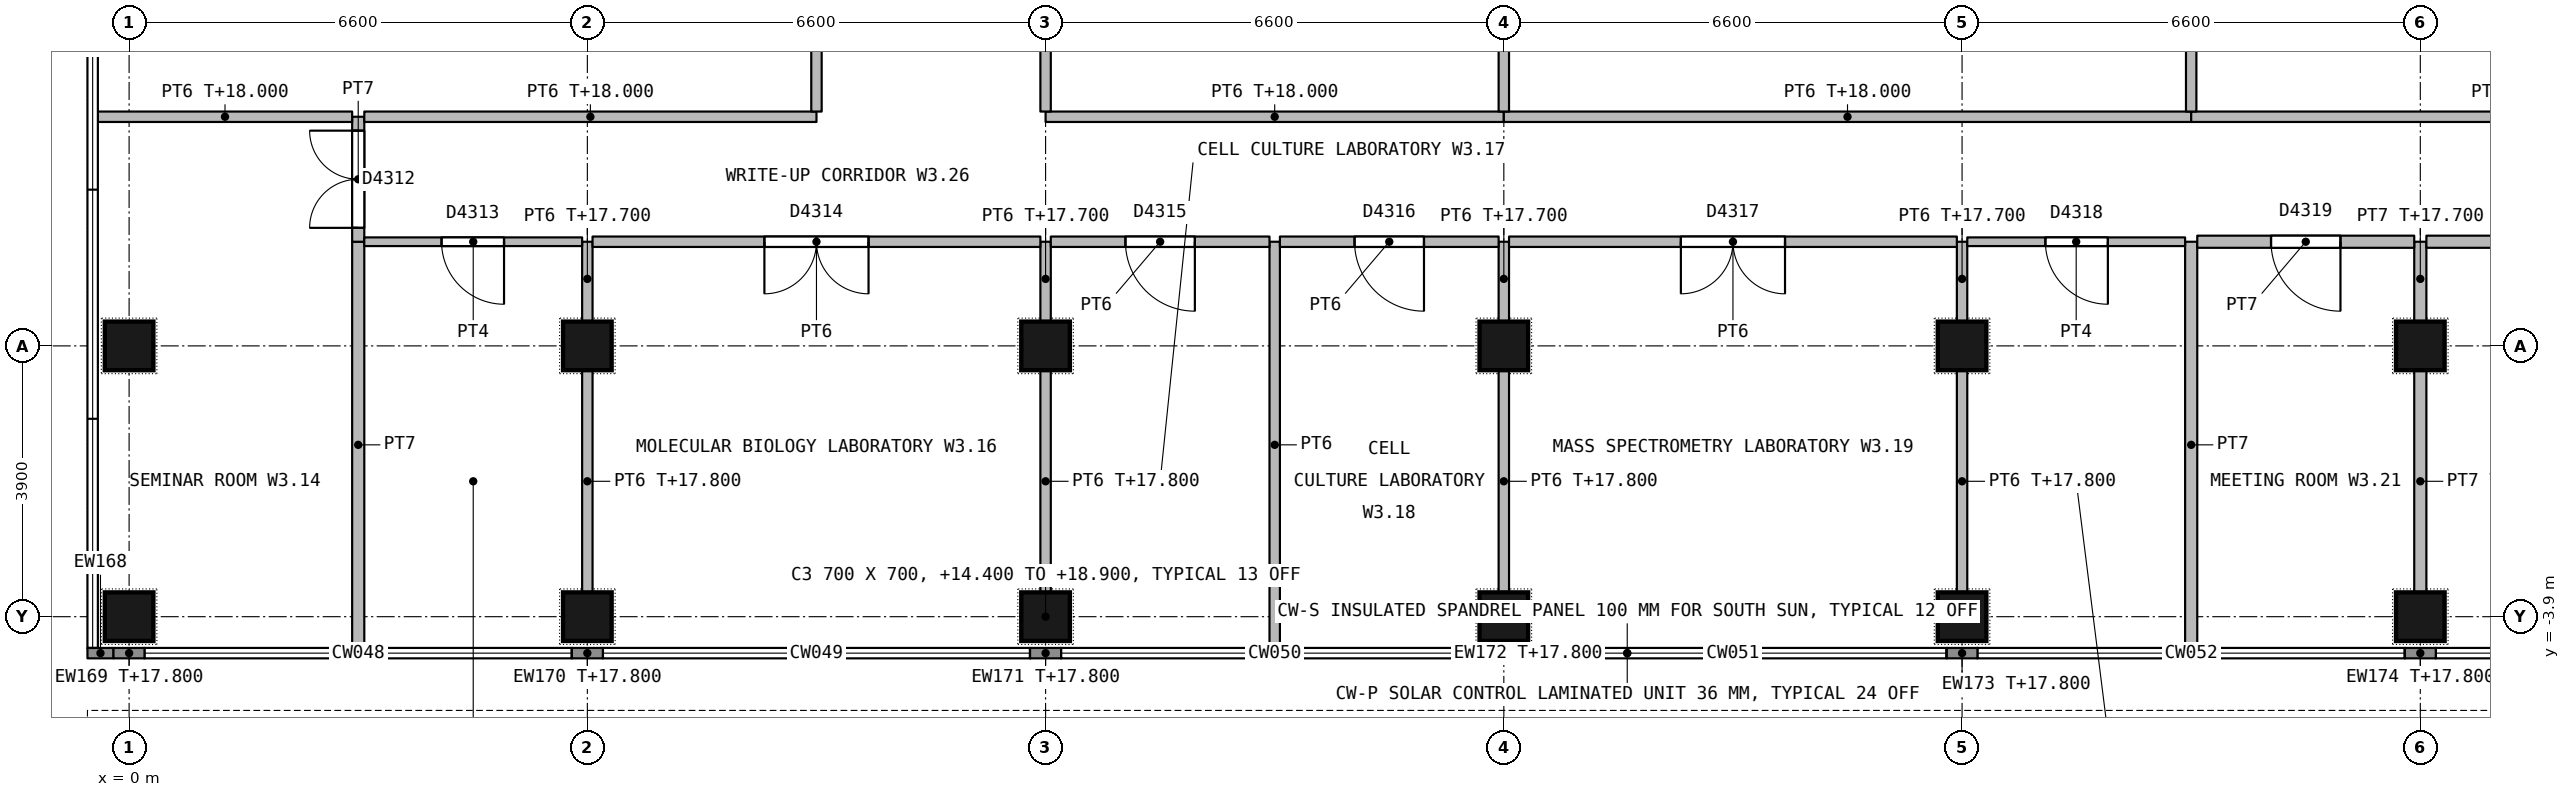
"""IFC4 building model, lengths in metres.
Left out: names, types, materials, properties, quantities, classifications, styles, units other than length and angle.
Written with IfcOpenShell. Run it as: python <this file> out.ifc"""

import sys

from ifc_helpers import new_model, si_unit, direction, frame, frame_2d, origin, origin_2d, place, context, subcontext, project, spatial, rectangle, extrude, element, fill, save


model = new_model("IFC4")
c1 = context("Model", 3, precision=1e-05, world=origin(), true_north=direction((0.0, 1.0)))
c2 = subcontext(c1, "Body", "Model", "MODEL_VIEW")
j1 = project(units=[si_unit("LENGTHUNIT", "METRE"), si_unit("PLANEANGLEUNIT", "RADIAN")], contexts=[c1])
p1 = place(None, origin())
s1 = spatial("IfcSite", under=j1, at=p1, CompositionType="ELEMENT")
p2 = place(p1, origin())
s2 = spatial("IfcBuilding", under=s1, at=p2, CompositionType="ELEMENT")
p3 = place(p2, frame((0.0, 0.0, 14.4)))
s3 = spatial("IfcBuildingStorey", under=s2, at=p3, CompositionType="ELEMENT", Elevation=14.4)
for number, where, z_axis, x_axis in (
    (1, (0.0, 0.0, 0.0), (0.0, 0.0, 1.0), (1.0, 0.0, 0.0)),
    (2, (6.6, 0.0, 0.0), (0.0, 0.0, 1.0), (1.0, 0.0, 0.0)),
    (3, (13.2, 0.0, 0.0), (0.0, 0.0, 1.0), (1.0, 0.0, 0.0)),
    (4, (19.8, 0.0, 0.0), (0.0, 0.0, 1.0), (1.0, 0.0, 0.0)),
    (5, (26.4, 0.0, 0.0), (0.0, 0.0, 1.0), (1.0, 0.0, 0.0)),
    (6, (33.0, 0.0, 0.0), (0.0, 0.0, 1.0), (1.0, 0.0, 0.0)),
    (7, (0.0, -3.9, 0.0), (0.0, 0.0, 1.0), (1.0, 0.0, 0.0)),
    (8, (6.6, -3.9, 0.0), (0.0, 0.0, 1.0), (1.0, 0.0, 0.0)),
    (9, (13.2, -3.9, 0.0), (0.0, 0.0, 1.0), (1.0, 0.0, 0.0)),
    (10, (19.8, -3.9, 0.0), (0.0, 0.0, 1.0), (1.0, 0.0, 0.0)),
    (11, (26.4, -3.9, 0.0), (0.0, 0.0, 1.0), (1.0, 0.0, 0.0)),
    (12, (33.0, -3.9, 0.0), (0.0, 0.0, 1.0), (1.0, 0.0, 0.0)),
):
    element("IfcColumn", number, at=place(p3, frame(where, z_axis=z_axis, x_axis=x_axis)), inside=s3, PredefinedType="COLUMN", context=c2, shape_type="SweptSolid", body=[
        extrude(rectangle(XDim=0.7, YDim=0.7, at=origin_2d()), origin(), (0.0, 0.0, 1.0), 4.5),
    ])
p4 = place(p3, frame((-0.225, -4.425, 0.0), z_axis=(0.0, 0.0, 1.0), x_axis=(-1.0, 0.0, 0.0)))
e13 = element("IfcWall", 13, at=p4, inside=s3, PredefinedType="STANDARD", context=c2, shape_type="SweptSolid", body=[
    extrude(rectangle(XDim=0.375, YDim=0.15, at=frame_2d((0.188, 0.0))), origin(), (0.0, 0.0, 1.0), 4.2),
])
p5 = place(p3, frame((0.225, -4.425, 0.0), z_axis=(0.0, 0.0, 1.0), x_axis=(-1.0, 0.0, 0.0)))
e14 = element("IfcWall", 14, at=p5, inside=s3, PredefinedType="STANDARD", context=c2, shape_type="SweptSolid", body=[
    extrude(rectangle(XDim=0.45, YDim=0.15, at=frame_2d((0.225, 0.0))), origin(), (0.0, 0.0, 1.0), 3.4),
])
for number, where, z_axis, x_axis in (
    (15, (6.825, -4.425, 0.0), (0.0, 0.0, 1.0), (-1.0, 0.0, 0.0)),
    (16, (13.425, -4.425, 0.0), (0.0, 0.0, 1.0), (-1.0, 0.0, 0.0)),
    (17, (20.025, -4.425, 0.0), (0.0, 0.0, 1.0), (-1.0, 0.0, 0.0)),
    (18, (26.625, -4.425, 0.0), (0.0, 0.0, 1.0), (-1.0, 0.0, 0.0)),
):
    element("IfcWall", number, at=place(p3, frame(where, z_axis=z_axis, x_axis=x_axis)), inside=s3, PredefinedType="STANDARD", context=c2, shape_type="SweptSolid", body=[
        extrude(rectangle(XDim=0.45, YDim=0.15, at=frame_2d((0.225, 0.0))), origin(), (0.0, 0.0, 1.0), 3.4),
    ])
p6 = place(p3, frame((33.225, -4.425, 0.0), z_axis=(0.0, 0.0, 1.0), x_axis=(-1.0, 0.0, 0.0)))
e19 = element("IfcWall", 19, at=p6, inside=s3, PredefinedType="STANDARD", context=c2, shape_type="SweptSolid", body=[
    extrude(rectangle(XDim=0.45, YDim=0.15, at=frame_2d((0.225, 0.0))), origin(), (0.0, 0.0, 1.0), 3.4),
])
p7 = place(p3, frame((3.3, -4.35, 0.0), z_axis=(0.0, 0.0, 1.0), x_axis=(0.0, 1.0, 0.0)))
e20 = element("IfcWall", 20, at=p7, inside=s3, PredefinedType="PARTITIONING", context=c2, shape_type="SweptSolid", body=[
    extrude(rectangle(XDim=5.85, YDim=0.175, at=frame_2d((2.925, 0.0))), origin(), (0.0, 0.0, 1.0), 4.2),
])
p8 = place(p3, frame((3.3, 1.5, 0.0), z_axis=(0.0, 0.0, 1.0), x_axis=(0.0, 1.0, 0.0)))
e21 = element("IfcWall", 21, at=p8, inside=s3, PredefinedType="PARTITIONING", context=c2, shape_type="SweptSolid", body=[
    extrude(rectangle(XDim=1.8, YDim=0.175, at=frame_2d((0.9, 0.0))), origin(), (0.0, 0.0, 1.0), 4.2),
])
p9 = place(p8, frame((0.2, 0.0, 0.0)))
e22 = element("IfcOpeningElement", 22, at=p9, cuts=e21, PredefinedType="OPENING", context=c2, shape_type="SweptSolid", body=[
    extrude(rectangle(XDim=1.4, YDim=2.1, at=frame_2d((0.7, 1.05))), frame((0.0, 0.097, 0.0), z_axis=(0.0, -1.0, 0.0), x_axis=(1.0, 0.0, 0.0)), (0.0, 0.0, 1.0), 0.195),
])
p10 = place(p3, frame((3.212, 3.3, 0.0), z_axis=(0.0, 0.0, 1.0), x_axis=(-1.0, 0.0, 0.0)))
e23 = element("IfcWall", 23, at=p10, inside=s3, PredefinedType="PARTITIONING", context=c2, shape_type="SweptSolid", body=[
    extrude(rectangle(XDim=3.662, YDim=0.15, at=frame_2d((1.831, 0.0))), origin(), (0.0, 0.0, 1.0), 3.6),
])
p11 = place(p3, frame((6.6, -3.55, 0.0), z_axis=(0.0, 0.0, 1.0), x_axis=(0.0, 1.0, 0.0)))
e24 = element("IfcWall", 24, at=p11, inside=s3, PredefinedType="PARTITIONING", context=c2, shape_type="SweptSolid", body=[
    extrude(rectangle(XDim=3.2, YDim=0.15, at=frame_2d((1.6, 0.0))), origin(), (0.0, 0.0, 1.0), 3.4),
])
p12 = place(p3, frame((6.6, 0.35, 0.0), z_axis=(0.0, 0.0, 1.0), x_axis=(0.0, 1.0, 0.0)))
e25 = element("IfcWall", 25, at=p12, inside=s3, PredefinedType="PARTITIONING", context=c2, shape_type="SweptSolid", body=[
    extrude(rectangle(XDim=1.15, YDim=0.15, at=frame_2d((0.575, 0.0))), origin(), (0.0, 0.0, 1.0), 3.3),
])
p13 = place(p3, frame((6.525, 1.5, 0.0), z_axis=(0.0, 0.0, 1.0), x_axis=(-1.0, 0.0, 0.0)))
e26 = element("IfcWall", 26, at=p13, inside=s3, PredefinedType="PARTITIONING", context=c2, shape_type="SweptSolid", body=[
    extrude(rectangle(XDim=3.137, YDim=0.125, at=frame_2d((1.569, 0.0))), origin(), (0.0, 0.0, 1.0), 4.2),
])
p14 = place(p13, frame((1.125, 0.0, 0.0)))
e27 = element("IfcOpeningElement", 27, at=p14, cuts=e26, PredefinedType="OPENING", context=c2, shape_type="SweptSolid", body=[
    extrude(rectangle(XDim=0.9, YDim=2.1, at=frame_2d((0.45, 1.05))), frame((0.0, 0.073, 0.0), z_axis=(0.0, -1.0, 0.0), x_axis=(1.0, 0.0, 0.0)), (0.0, 0.0, 1.0), 0.145),
])
p15 = place(p3, frame((13.2, -3.55, 0.0), z_axis=(0.0, 0.0, 1.0), x_axis=(0.0, 1.0, 0.0)))
e28 = element("IfcWall", 28, at=p15, inside=s3, PredefinedType="PARTITIONING", context=c2, shape_type="SweptSolid", body=[
    extrude(rectangle(XDim=3.2, YDim=0.15, at=frame_2d((1.6, 0.0))), origin(), (0.0, 0.0, 1.0), 3.4),
])
p16 = place(p3, frame((13.2, 0.35, 0.0), z_axis=(0.0, 0.0, 1.0), x_axis=(0.0, 1.0, 0.0)))
e29 = element("IfcWall", 29, at=p16, inside=s3, PredefinedType="PARTITIONING", context=c2, shape_type="SweptSolid", body=[
    extrude(rectangle(XDim=1.15, YDim=0.15, at=frame_2d((0.575, 0.0))), origin(), (0.0, 0.0, 1.0), 3.3),
])
p17 = place(p3, frame((13.125, 1.5, 0.0), z_axis=(0.0, 0.0, 1.0), x_axis=(-1.0, 0.0, 0.0)))
e30 = element("IfcWall", 30, at=p17, inside=s3, PredefinedType="PARTITIONING", context=c2, shape_type="SweptSolid", body=[
    extrude(rectangle(XDim=6.45, YDim=0.15, at=frame_2d((3.225, 0.0))), origin(), (0.0, 0.0, 1.0), 4.2),
])
p18 = place(p17, frame((2.475, 0.0, 0.0)))
e31 = element("IfcOpeningElement", 31, at=p18, cuts=e30, PredefinedType="OPENING", context=c2, shape_type="SweptSolid", body=[
    extrude(rectangle(XDim=1.5, YDim=2.1, at=frame_2d((0.75, 1.05))), frame((0.0, 0.085, 0.0), z_axis=(0.0, -1.0, 0.0), x_axis=(1.0, 0.0, 0.0)), (0.0, 0.0, 1.0), 0.17),
])
p19 = place(p3, frame((16.5, -4.35, 0.0), z_axis=(0.0, 0.0, 1.0), x_axis=(0.0, 1.0, 0.0)))
e32 = element("IfcWall", 32, at=p19, inside=s3, PredefinedType="PARTITIONING", context=c2, shape_type="SweptSolid", body=[
    extrude(rectangle(XDim=5.85, YDim=0.15, at=frame_2d((2.925, 0.0))), origin(), (0.0, 0.0, 1.0), 4.2),
])
p20 = place(p3, frame((16.425, 1.5, 0.0), z_axis=(0.0, 0.0, 1.0), x_axis=(-1.0, 0.0, 0.0)))
e33 = element("IfcWall", 33, at=p20, inside=s3, PredefinedType="PARTITIONING", context=c2, shape_type="SweptSolid", body=[
    extrude(rectangle(XDim=3.15, YDim=0.15, at=frame_2d((1.575, 0.0))), origin(), (0.0, 0.0, 1.0), 4.2),
])
p21 = place(p20, frame((1.075, 0.0, 0.0)))
e34 = element("IfcOpeningElement", 34, at=p21, cuts=e33, PredefinedType="OPENING", context=c2, shape_type="SweptSolid", body=[
    extrude(rectangle(XDim=1.0, YDim=2.1, at=frame_2d((0.5, 1.05))), frame((0.0, 0.085, 0.0), z_axis=(0.0, -1.0, 0.0), x_axis=(1.0, 0.0, 0.0)), (0.0, 0.0, 1.0), 0.17),
])
p22 = place(p3, frame((19.8, -3.55, 0.0), z_axis=(0.0, 0.0, 1.0), x_axis=(0.0, 1.0, 0.0)))
e35 = element("IfcWall", 35, at=p22, inside=s3, PredefinedType="PARTITIONING", context=c2, shape_type="SweptSolid", body=[
    extrude(rectangle(XDim=3.2, YDim=0.15, at=frame_2d((1.6, 0.0))), origin(), (0.0, 0.0, 1.0), 3.4),
])
p23 = place(p3, frame((19.8, 0.35, 0.0), z_axis=(0.0, 0.0, 1.0), x_axis=(0.0, 1.0, 0.0)))
e36 = element("IfcWall", 36, at=p23, inside=s3, PredefinedType="PARTITIONING", context=c2, shape_type="SweptSolid", body=[
    extrude(rectangle(XDim=1.15, YDim=0.15, at=frame_2d((0.575, 0.0))), origin(), (0.0, 0.0, 1.0), 3.3),
])
p24 = place(p3, frame((19.725, 1.5, 0.0), z_axis=(0.0, 0.0, 1.0), x_axis=(-1.0, 0.0, 0.0)))
e37 = element("IfcWall", 37, at=p24, inside=s3, PredefinedType="PARTITIONING", context=c2, shape_type="SweptSolid", body=[
    extrude(rectangle(XDim=3.15, YDim=0.15, at=frame_2d((1.575, 0.0))), origin(), (0.0, 0.0, 1.0), 4.2),
])
p25 = place(p24, frame((1.075, 0.0, 0.0)))
e38 = element("IfcOpeningElement", 38, at=p25, cuts=e37, PredefinedType="OPENING", context=c2, shape_type="SweptSolid", body=[
    extrude(rectangle(XDim=1.0, YDim=2.1, at=frame_2d((0.5, 1.05))), frame((0.0, 0.085, 0.0), z_axis=(0.0, -1.0, 0.0), x_axis=(1.0, 0.0, 0.0)), (0.0, 0.0, 1.0), 0.17),
])
p26 = place(p3, frame((26.4, -3.55, 0.0), z_axis=(0.0, 0.0, 1.0), x_axis=(0.0, 1.0, 0.0)))
e39 = element("IfcWall", 39, at=p26, inside=s3, PredefinedType="PARTITIONING", context=c2, shape_type="SweptSolid", body=[
    extrude(rectangle(XDim=3.2, YDim=0.15, at=frame_2d((1.6, 0.0))), origin(), (0.0, 0.0, 1.0), 3.4),
])
p27 = place(p3, frame((26.4, 0.35, 0.0), z_axis=(0.0, 0.0, 1.0), x_axis=(0.0, 1.0, 0.0)))
e40 = element("IfcWall", 40, at=p27, inside=s3, PredefinedType="PARTITIONING", context=c2, shape_type="SweptSolid", body=[
    extrude(rectangle(XDim=1.15, YDim=0.15, at=frame_2d((0.575, 0.0))), origin(), (0.0, 0.0, 1.0), 3.3),
])
p28 = place(p3, frame((26.325, 1.5, 0.0), z_axis=(0.0, 0.0, 1.0), x_axis=(-1.0, 0.0, 0.0)))
e41 = element("IfcWall", 41, at=p28, inside=s3, PredefinedType="PARTITIONING", context=c2, shape_type="SweptSolid", body=[
    extrude(rectangle(XDim=6.45, YDim=0.15, at=frame_2d((3.225, 0.0))), origin(), (0.0, 0.0, 1.0), 4.2),
])
p29 = place(p28, frame((2.475, 0.0, 0.0)))
e42 = element("IfcOpeningElement", 42, at=p29, cuts=e41, PredefinedType="OPENING", context=c2, shape_type="SweptSolid", body=[
    extrude(rectangle(XDim=1.5, YDim=2.1, at=frame_2d((0.75, 1.05))), frame((0.0, 0.085, 0.0), z_axis=(0.0, -1.0, 0.0), x_axis=(1.0, 0.0, 0.0)), (0.0, 0.0, 1.0), 0.17),
])
p30 = place(p3, frame((29.7, -4.35, 0.0), z_axis=(0.0, 0.0, 1.0), x_axis=(0.0, 1.0, 0.0)))
e43 = element("IfcWall", 43, at=p30, inside=s3, PredefinedType="PARTITIONING", context=c2, shape_type="SweptSolid", body=[
    extrude(rectangle(XDim=5.85, YDim=0.175, at=frame_2d((2.925, 0.0))), origin(), (0.0, 0.0, 1.0), 4.2),
])
p31 = place(p3, frame((29.613, 1.5, 0.0), z_axis=(0.0, 0.0, 1.0), x_axis=(-1.0, 0.0, 0.0)))
e44 = element("IfcWall", 44, at=p31, inside=s3, PredefinedType="PARTITIONING", context=c2, shape_type="SweptSolid", body=[
    extrude(rectangle(XDim=3.137, YDim=0.125, at=frame_2d((1.569, 0.0))), origin(), (0.0, 0.0, 1.0), 4.2),
])
p32 = place(p31, frame((1.113, 0.0, 0.0)))
e45 = element("IfcOpeningElement", 45, at=p32, cuts=e44, PredefinedType="OPENING", context=c2, shape_type="SweptSolid", body=[
    extrude(rectangle(XDim=0.9, YDim=2.1, at=frame_2d((0.45, 1.05))), frame((0.0, 0.073, 0.0), z_axis=(0.0, -1.0, 0.0), x_axis=(1.0, 0.0, 0.0)), (0.0, 0.0, 1.0), 0.145),
])
p33 = place(p3, frame((33.0, -3.55, 0.0), z_axis=(0.0, 0.0, 1.0), x_axis=(0.0, 1.0, 0.0)))
e46 = element("IfcWall", 46, at=p33, inside=s3, PredefinedType="PARTITIONING", context=c2, shape_type="SweptSolid", body=[
    extrude(rectangle(XDim=3.2, YDim=0.175, at=frame_2d((1.6, 0.0))), origin(), (0.0, 0.0, 1.0), 3.4),
])
p34 = place(p3, frame((33.0, 0.35, 0.0), z_axis=(0.0, 0.0, 1.0), x_axis=(0.0, 1.0, 0.0)))
e47 = element("IfcWall", 47, at=p34, inside=s3, PredefinedType="PARTITIONING", context=c2, shape_type="SweptSolid", body=[
    extrude(rectangle(XDim=1.15, YDim=0.175, at=frame_2d((0.575, 0.0))), origin(), (0.0, 0.0, 1.0), 3.3),
])
p35 = place(p3, frame((32.913, 1.5, 0.0), z_axis=(0.0, 0.0, 1.0), x_axis=(-1.0, 0.0, 0.0)))
e48 = element("IfcWall", 48, at=p35, inside=s3, PredefinedType="PARTITIONING", context=c2, shape_type="SweptSolid", body=[
    extrude(rectangle(XDim=3.125, YDim=0.175, at=frame_2d((1.562, 0.0))), origin(), (0.0, 0.0, 1.0), 4.2),
])
p36 = place(p35, frame((1.062, 0.0, 0.0)))
e49 = element("IfcOpeningElement", 49, at=p36, cuts=e48, PredefinedType="OPENING", context=c2, shape_type="SweptSolid", body=[
    extrude(rectangle(XDim=1.0, YDim=2.1, at=frame_2d((0.5, 1.05))), frame((0.0, 0.097, 0.0), z_axis=(0.0, -1.0, 0.0), x_axis=(1.0, 0.0, 0.0)), (0.0, 0.0, 1.0), 0.195),
])
p37 = place(p3, frame((39.525, 1.5, 0.0), z_axis=(0.0, 0.0, 1.0), x_axis=(-1.0, 0.0, 0.0)))
e50 = element("IfcWall", 50, at=p37, inside=s3, PredefinedType="PARTITIONING", context=c2, shape_type="SweptSolid", body=[
    extrude(rectangle(XDim=6.438, YDim=0.175, at=frame_2d((3.219, 0.0))), origin(), (0.0, 0.0, 1.0), 4.2),
])
p38 = place(p37, frame((2.525, 0.0, 0.0)))
e51 = element("IfcOpeningElement", 51, at=p38, cuts=e50, PredefinedType="OPENING", context=c2, shape_type="SweptSolid", body=[
    extrude(rectangle(XDim=1.4, YDim=2.1, at=frame_2d((0.7, 1.05))), frame((0.0, 0.097, 0.0), z_axis=(0.0, -1.0, 0.0), x_axis=(1.0, 0.0, 0.0)), (0.0, 0.0, 1.0), 0.195),
])
p39 = place(p3, frame((9.9, 3.3, 0.0), z_axis=(0.0, 0.0, 1.0), x_axis=(-1.0, 0.0, 0.0)))
e52 = element("IfcWall", 52, at=p39, inside=s3, PredefinedType="PARTITIONING", context=c2, shape_type="SweptSolid", body=[
    extrude(rectangle(XDim=6.512, YDim=0.15, at=frame_2d((3.256, 0.0))), origin(), (0.0, 0.0, 1.0), 3.6),
])
p40 = place(p3, frame((19.8, 3.3, 0.0), z_axis=(0.0, 0.0, 1.0), x_axis=(-1.0, 0.0, 0.0)))
e53 = element("IfcWall", 53, at=p40, inside=s3, PredefinedType="PARTITIONING", context=c2, shape_type="SweptSolid", body=[
    extrude(rectangle(XDim=6.6, YDim=0.15, at=frame_2d((3.3, 0.0))), origin(), (0.0, 0.0, 1.0), 3.6),
])
p41 = place(p3, frame((29.7, 3.3, 0.0), z_axis=(0.0, 0.0, 1.0), x_axis=(-1.0, 0.0, 0.0)))
e54 = element("IfcWall", 54, at=p41, inside=s3, PredefinedType="PARTITIONING", context=c2, shape_type="SweptSolid", body=[
    extrude(rectangle(XDim=9.9, YDim=0.15, at=frame_2d((4.95, 0.0))), origin(), (0.0, 0.0, 1.0), 3.6),
])
p42 = place(p3, frame((39.6, 3.3, 0.0), z_axis=(0.0, 0.0, 1.0), x_axis=(-1.0, 0.0, 0.0)))
e55 = element("IfcWall", 55, at=p42, inside=s3, PredefinedType="PARTITIONING", context=c2, shape_type="SweptSolid", body=[
    extrude(rectangle(XDim=9.9, YDim=0.15, at=frame_2d((4.95, 0.0))), origin(), (0.0, 0.0, 1.0), 3.6),
])
p43 = place(p3, frame((9.9, 3.375, 0.0), z_axis=(0.0, 0.0, 1.0), x_axis=(0.0, 1.0, 0.0)))
e56 = element("IfcWall", 56, at=p43, inside=s3, PredefinedType="PARTITIONING", context=c2, shape_type="SweptSolid", body=[
    extrude(rectangle(XDim=6.45, YDim=0.15, at=frame_2d((3.225, 0.0))), origin(), (0.0, 0.0, 1.0), 4.2),
])
for number, where, z_axis, x_axis in (
    (57, (13.2, 3.375, 0.0), (0.0, 0.0, 1.0), (0.0, 1.0, 0.0)),
    (58, (19.8, 3.375, 0.0), (0.0, 0.0, 1.0), (0.0, 1.0, 0.0)),
):
    element("IfcWall", number, at=place(p3, frame(where, z_axis=z_axis, x_axis=x_axis)), inside=s3, PredefinedType="PARTITIONING", context=c2, shape_type="SweptSolid", body=[
        extrude(rectangle(XDim=6.175, YDim=0.15, at=frame_2d((3.087, 0.0))), origin(), (0.0, 0.0, 1.0), 3.3),
    ])
p44 = place(p3, frame((29.7, 3.375, 0.0), z_axis=(0.0, 0.0, 1.0), x_axis=(0.0, 1.0, 0.0)))
e59 = element("IfcWall", 59, at=p44, inside=s3, PredefinedType="PARTITIONING", context=c2, shape_type="SweptSolid", body=[
    extrude(rectangle(XDim=6.45, YDim=0.15, at=frame_2d((3.225, 0.0))), origin(), (0.0, 0.0, 1.0), 4.2),
])
p45 = place(p9, origin())
e60 = element("IfcDoor", 60, at=p45, inside=s3, OperationType="DOUBLE_DOOR_SINGLE_SWING", PredefinedType="DOOR", context=c2, shape_type="SweptSolid", body=[
    extrude(rectangle(XDim=1.4, YDim=2.1, at=frame_2d((0.7, 1.05))), frame((0.0, 0.027, 0.0), z_axis=(0.0, -1.0, 0.0), x_axis=(1.0, 0.0, 0.0)), (0.0, 0.0, 1.0), 0.054),
])
fill(e22, e60)
p46 = place(p14, origin())
e61 = element("IfcDoor", 61, at=p46, inside=s3, OperationType="SINGLE_SWING_LEFT", PredefinedType="DOOR", context=c2, shape_type="SweptSolid", body=[
    extrude(rectangle(XDim=0.9, YDim=2.1, at=frame_2d((0.45, 1.05))), frame((0.0, 0.027, 0.0), z_axis=(0.0, -1.0, 0.0), x_axis=(1.0, 0.0, 0.0)), (0.0, 0.0, 1.0), 0.054),
])
fill(e27, e61)
p47 = place(p18, origin())
e62 = element("IfcDoor", 62, at=p47, inside=s3, OperationType="DOUBLE_DOOR_SINGLE_SWING", PredefinedType="DOOR", context=c2, shape_type="SweptSolid", body=[
    extrude(rectangle(XDim=1.5, YDim=2.1, at=frame_2d((0.75, 1.05))), frame((0.0, 0.027, 0.0), z_axis=(0.0, -1.0, 0.0), x_axis=(1.0, 0.0, 0.0)), (0.0, 0.0, 1.0), 0.054),
])
fill(e31, e62)
p48 = place(p21, origin())
e63 = element("IfcDoor", 63, at=p48, inside=s3, OperationType="SINGLE_SWING_LEFT", PredefinedType="DOOR", context=c2, shape_type="SweptSolid", body=[
    extrude(rectangle(XDim=1.0, YDim=2.1, at=frame_2d((0.5, 1.05))), frame((0.0, 0.027, 0.0), z_axis=(0.0, -1.0, 0.0), x_axis=(1.0, 0.0, 0.0)), (0.0, 0.0, 1.0), 0.054),
])
fill(e34, e63)
p49 = place(p25, origin())
e64 = element("IfcDoor", 64, at=p49, inside=s3, OperationType="SINGLE_SWING_LEFT", PredefinedType="DOOR", context=c2, shape_type="SweptSolid", body=[
    extrude(rectangle(XDim=1.0, YDim=2.1, at=frame_2d((0.5, 1.05))), frame((0.0, 0.027, 0.0), z_axis=(0.0, -1.0, 0.0), x_axis=(1.0, 0.0, 0.0)), (0.0, 0.0, 1.0), 0.054),
])
fill(e38, e64)
p50 = place(p29, origin())
e65 = element("IfcDoor", 65, at=p50, inside=s3, OperationType="DOUBLE_DOOR_SINGLE_SWING", PredefinedType="DOOR", context=c2, shape_type="SweptSolid", body=[
    extrude(rectangle(XDim=1.5, YDim=2.1, at=frame_2d((0.75, 1.05))), frame((0.0, 0.027, 0.0), z_axis=(0.0, -1.0, 0.0), x_axis=(1.0, 0.0, 0.0)), (0.0, 0.0, 1.0), 0.054),
])
fill(e42, e65)
p51 = place(p32, origin())
e66 = element("IfcDoor", 66, at=p51, inside=s3, OperationType="SINGLE_SWING_LEFT", PredefinedType="DOOR", context=c2, shape_type="SweptSolid", body=[
    extrude(rectangle(XDim=0.9, YDim=2.1, at=frame_2d((0.45, 1.05))), frame((0.0, 0.027, 0.0), z_axis=(0.0, -1.0, 0.0), x_axis=(1.0, 0.0, 0.0)), (0.0, 0.0, 1.0), 0.054),
])
fill(e45, e66)
p52 = place(p36, origin())
e67 = element("IfcDoor", 67, at=p52, inside=s3, OperationType="SINGLE_SWING_LEFT", PredefinedType="DOOR", context=c2, shape_type="SweptSolid", body=[
    extrude(rectangle(XDim=1.0, YDim=2.1, at=frame_2d((0.5, 1.05))), frame((0.0, 0.027, 0.0), z_axis=(0.0, -1.0, 0.0), x_axis=(1.0, 0.0, 0.0)), (0.0, 0.0, 1.0), 0.054),
])
fill(e49, e67)
save(model, sys.argv[1])
